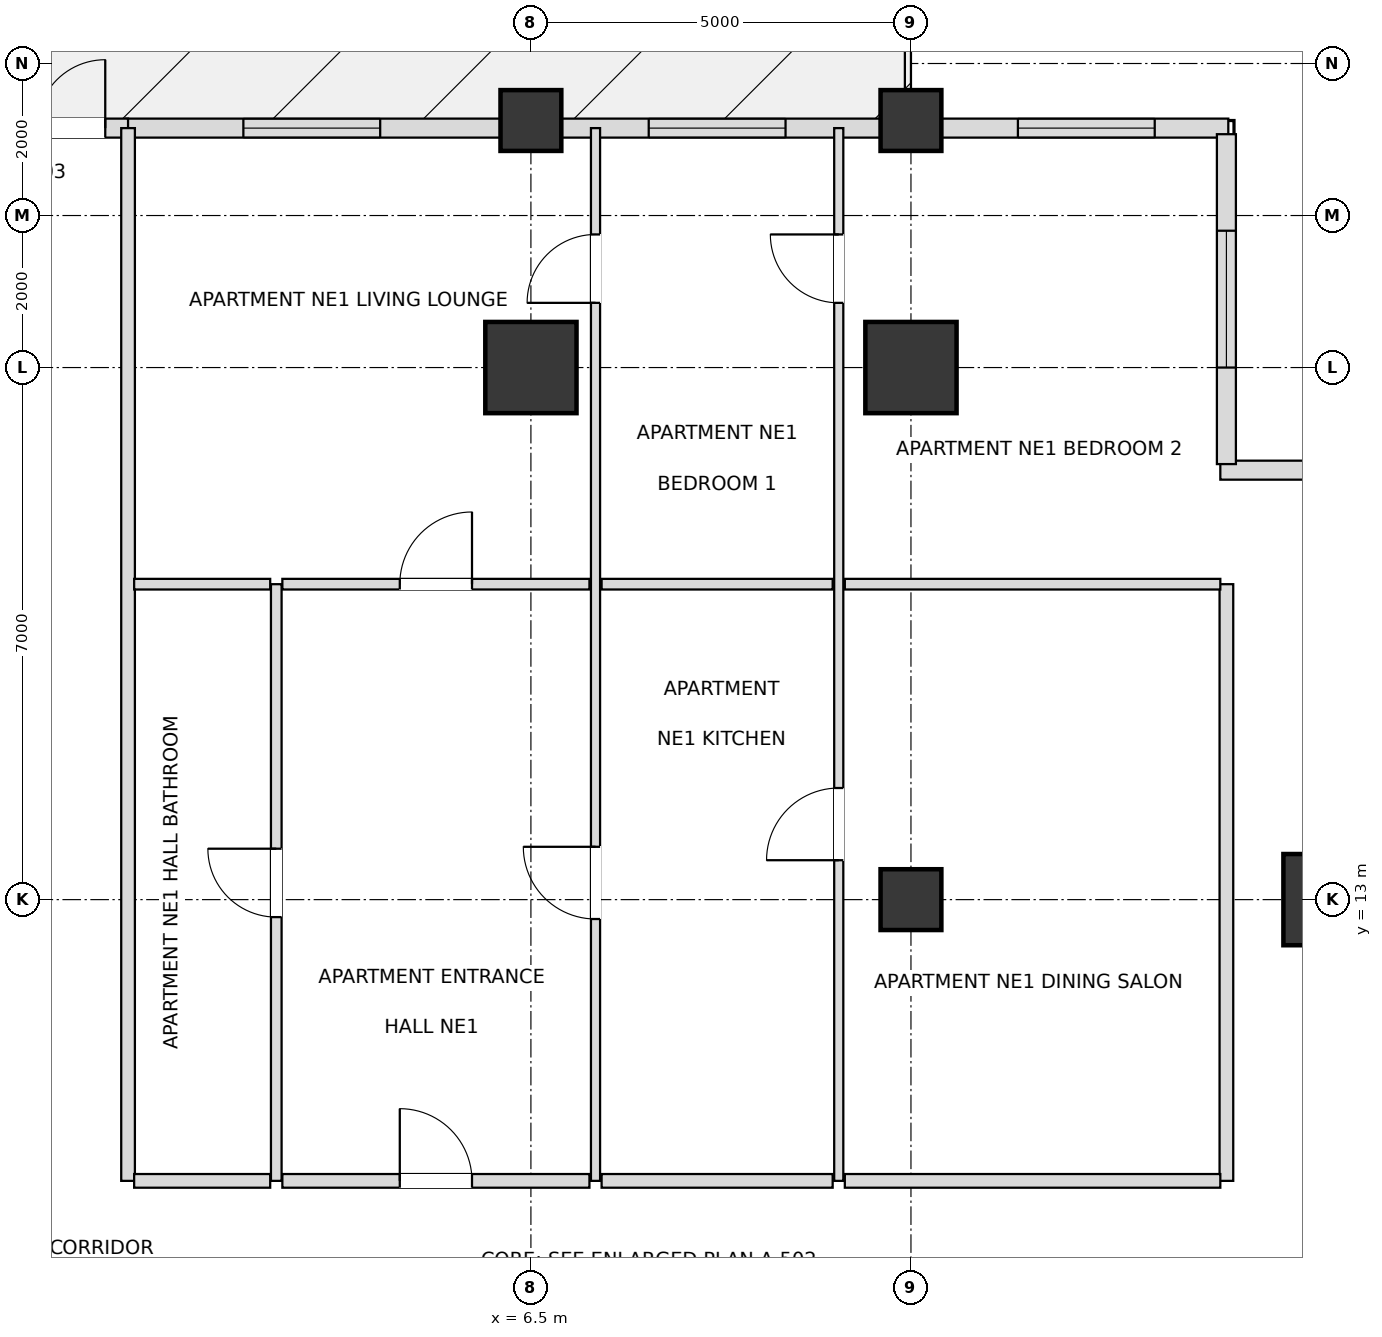
"""IFC4 building model, lengths in metres.
Left out: names, types, materials, properties, quantities, classifications, styles, units other than length and angle.
Written with IfcOpenShell. Run it as: python <this file> out.ifc"""

import sys

from ifc_helpers import new_model, si_unit, direction, frame, frame_2d, origin, origin_2d, place, context, subcontext, project, spatial, rectangle, extrude, element, fill, save


model = new_model("IFC4")
c1 = context("Model", 3, precision=1e-05, world=origin(), true_north=direction((0.0, 1.0)))
c2 = subcontext(c1, "Body", "Model", "MODEL_VIEW")
j1 = project(units=[si_unit("LENGTHUNIT", "METRE"), si_unit("PLANEANGLEUNIT", "RADIAN")], contexts=[c1])
p1 = place(None, origin())
s1 = spatial("IfcSite", under=j1, at=p1, CompositionType="ELEMENT")
p2 = place(p1, origin())
s2 = spatial("IfcBuilding", under=s1, at=p2, CompositionType="ELEMENT")
p3 = place(p2, frame((0.0, 0.0, 99.0)))
s3 = spatial("IfcBuildingStorey", under=s2, at=p3, CompositionType="ELEMENT", Elevation=99.0)
for number, where, z_axis, x_axis in (
    (1, (17.0, 13.0, 0.0), (0.0, 0.0, 1.0), (1.0, 0.0, 0.0)),
    (2, (11.5, 20.0, 0.0), (0.0, 0.0, 1.0), (1.0, 0.0, 0.0)),
    (3, (6.5, 20.0, 0.0), (0.0, 0.0, 1.0), (1.0, 0.0, 0.0)),
):
    element("IfcColumn", number, at=place(p3, frame(where, z_axis=z_axis, x_axis=x_axis)), inside=s3, PredefinedType="USERDEFINED", context=c2, shape_type="SweptSolid", body=[
        extrude(rectangle(XDim=1.2, YDim=1.2, at=origin_2d()), origin(), (0.0, 0.0, 1.0), 3.6),
    ])
for number, where, z_axis, x_axis in (
    (4, (11.5, 13.0, 0.0), (0.0, 0.0, 1.0), (1.0, 0.0, 0.0)),
    (5, (6.5, 23.25, 0.0), (0.0, 0.0, 1.0), (1.0, 0.0, 0.0)),
    (6, (11.5, 23.25, 0.0), (0.0, 0.0, 1.0), (1.0, 0.0, 0.0)),
):
    element("IfcColumn", number, at=place(p3, frame(where, z_axis=z_axis, x_axis=x_axis)), inside=s3, PredefinedType="COLUMN", context=c2, shape_type="SweptSolid", body=[
        extrude(rectangle(XDim=0.8, YDim=0.8, at=origin_2d()), origin(), (0.0, 0.0, 1.0), 3.6),
    ])
p4 = place(p3, frame((15.675, 23.15, 0.0), z_axis=(0.0, 0.0, 1.0), x_axis=(-1.0, 0.0, 0.0)))
e7 = element("IfcWall", 7, at=p4, inside=s3, PredefinedType="SOLIDWALL", context=c2, shape_type="SweptSolid", body=[
    extrude(rectangle(XDim=3.78, YDim=0.25, at=frame_2d((1.89, 0.0))), origin(), (0.0, 0.0, 1.0), 2.736),
])
p5 = place(p4, frame((0.968, 0.0, 0.72)))
e8 = element("IfcOpeningElement", 8, at=p5, cuts=e7, PredefinedType="OPENING", context=c2, shape_type="SweptSolid", body=[
    extrude(rectangle(XDim=1.8, YDim=1.68, at=frame_2d((0.9, 0.84))), frame((0.0, 0.135, 0.0), z_axis=(0.0, -1.0, 0.0), x_axis=(1.0, 0.0, 0.0)), (0.0, 0.0, 1.0), 0.27),
])
p6 = place(p3, frame((11.105, 23.15, 0.0), z_axis=(0.0, 0.0, 1.0), x_axis=(-1.0, 0.0, 0.0)))
e9 = element("IfcWall", 9, at=p6, inside=s3, PredefinedType="SOLIDWALL", context=c2, shape_type="SweptSolid", body=[
    extrude(rectangle(XDim=4.21, YDim=0.25, at=frame_2d((2.105, 0.0))), origin(), (0.0, 0.0, 1.0), 2.736),
])
p7 = place(p6, frame((1.255, 0.0, 0.72)))
e10 = element("IfcOpeningElement", 10, at=p7, cuts=e9, PredefinedType="OPENING", context=c2, shape_type="SweptSolid", body=[
    extrude(rectangle(XDim=1.8, YDim=1.68, at=frame_2d((0.9, 0.84))), frame((0.0, 0.135, 0.0), z_axis=(0.0, -1.0, 0.0), x_axis=(1.0, 0.0, 0.0)), (0.0, 0.0, 1.0), 0.27),
])
p8 = place(p3, frame((6.105, 23.15, 0.0), z_axis=(0.0, 0.0, 1.0), x_axis=(-1.0, 0.0, 0.0)))
e11 = element("IfcWall", 11, at=p8, inside=s3, PredefinedType="SOLIDWALL", context=c2, shape_type="SweptSolid", body=[
    extrude(rectangle(XDim=4.93, YDim=0.25, at=frame_2d((2.465, 0.0))), origin(), (0.0, 0.0, 1.0), 2.736),
])
p9 = place(p8, frame((1.588, 0.0, 0.72)))
e12 = element("IfcOpeningElement", 12, at=p9, cuts=e11, PredefinedType="OPENING", context=c2, shape_type="SweptSolid", body=[
    extrude(rectangle(XDim=1.8, YDim=1.68, at=frame_2d((0.9, 0.84))), frame((0.0, 0.135, 0.0), z_axis=(0.0, -1.0, 0.0), x_axis=(1.0, 0.0, 0.0)), (0.0, 0.0, 1.0), 0.27),
])
p10 = place(p3, frame((-1.2, 23.15, 0.0), z_axis=(0.0, 0.0, 1.0), x_axis=(1.0, 0.0, 0.0)))
e13 = element("IfcWall", 13, at=p10, inside=s3, PredefinedType="SOLIDWALL", context=c2, shape_type="SweptSolid", body=[
    extrude(rectangle(XDim=2.4, YDim=0.25, at=frame_2d((1.2, 0.0))), origin(), (0.0, 0.0, 1.0), 2.736),
])
p11 = place(p10, frame((0.3, 0.0, 0.0)))
e14 = element("IfcOpeningElement", 14, at=p11, cuts=e13, PredefinedType="OPENING", context=c2, shape_type="SweptSolid", body=[
    extrude(rectangle(XDim=1.8, YDim=2.3, at=frame_2d((0.9, 1.15))), frame((0.0, 0.135, 0.0), z_axis=(0.0, -1.0, 0.0), x_axis=(1.0, 0.0, 0.0)), (0.0, 0.0, 1.0), 0.27),
])
p12 = place(p3, frame((20.23, 18.65, 0.0), z_axis=(0.0, 0.0, 1.0), x_axis=(-1.0, 0.0, 0.0)))
e15 = element("IfcWall", 15, at=p12, inside=s3, PredefinedType="SOLIDWALL", context=c2, shape_type="SweptSolid", body=[
    extrude(rectangle(XDim=4.66, YDim=0.25, at=frame_2d((2.33, 0.0))), origin(), (0.0, 0.0, 1.0), 2.736),
])
p13 = place(p12, frame((1.43, 0.0, 0.72)))
e16 = element("IfcOpeningElement", 16, at=p13, cuts=e15, PredefinedType="OPENING", context=c2, shape_type="SweptSolid", body=[
    extrude(rectangle(XDim=1.8, YDim=1.68, at=frame_2d((0.9, 0.84))), frame((0.0, 0.135, 0.0), z_axis=(0.0, -1.0, 0.0), x_axis=(1.0, 0.0, 0.0)), (0.0, 0.0, 1.0), 0.27),
])
p14 = place(p3, frame((15.65, 18.73, 0.0), z_axis=(0.0, 0.0, 1.0), x_axis=(0.0, 1.0, 0.0)))
e17 = element("IfcWall", 17, at=p14, inside=s3, PredefinedType="SOLIDWALL", context=c2, shape_type="SweptSolid", body=[
    extrude(rectangle(XDim=4.34, YDim=0.25, at=frame_2d((2.17, 0.0))), origin(), (0.0, 0.0, 1.0), 2.736),
])
p15 = place(p14, frame((1.27, 0.0, 0.72)))
e18 = element("IfcOpeningElement", 18, at=p15, cuts=e17, PredefinedType="OPENING", context=c2, shape_type="SweptSolid", body=[
    extrude(rectangle(XDim=1.8, YDim=1.68, at=frame_2d((0.9, 0.84))), frame((0.0, 0.135, 0.0), z_axis=(0.0, -1.0, 0.0), x_axis=(1.0, 0.0, 0.0)), (0.0, 0.0, 1.0), 0.27),
])
p16 = place(p3, frame((1.2, 9.3, 0.0), z_axis=(0.0, 0.0, 1.0), x_axis=(0.0, 1.0, 0.0)))
e19 = element("IfcWall", 19, at=p16, inside=s3, PredefinedType="PARTITIONING", context=c2, shape_type="SweptSolid", body=[
    extrude(rectangle(XDim=13.85, YDim=0.18, at=frame_2d((6.925, 0.0))), origin(), (0.0, 0.0, 1.0), 2.816),
])
p17 = place(p3, frame((3.15, 9.3, 0.0), z_axis=(0.0, 0.0, 1.0), x_axis=(0.0, 1.0, 0.0)))
e20 = element("IfcWall", 20, at=p17, inside=s3, PredefinedType="PARTITIONING", context=c2, shape_type="SweptSolid", body=[
    extrude(rectangle(XDim=7.85, YDim=0.14, at=frame_2d((3.925, 0.0))), origin(), (0.0, 0.0, 1.0), 3.38),
])
p18 = place(p17, frame((3.47, 0.0, 0.0)))
e21 = element("IfcOpeningElement", 21, at=p18, cuts=e20, PredefinedType="OPENING", context=c2, shape_type="SweptSolid", body=[
    extrude(rectangle(XDim=0.9, YDim=2.1, at=frame_2d((0.45, 1.05))), frame((0.0, 0.08, 0.0), z_axis=(0.0, -1.0, 0.0), x_axis=(1.0, 0.0, 0.0)), (0.0, 0.0, 1.0), 0.16),
])
p19 = place(p3, frame((7.35, 9.3, 0.0), z_axis=(0.0, 0.0, 1.0), x_axis=(0.0, 1.0, 0.0)))
e22 = element("IfcWall", 22, at=p19, inside=s3, PredefinedType="PARTITIONING", context=c2, shape_type="SweptSolid", body=[
    extrude(rectangle(XDim=13.85, YDim=0.12, at=frame_2d((6.925, 0.0))), origin(), (0.0, 0.0, 1.0), 2.816),
])
p20 = place(p19, frame((3.445, 0.0, 0.0)))
e23 = element("IfcOpeningElement", 23, at=p20, cuts=e22, PredefinedType="OPENING", context=c2, shape_type="SweptSolid", body=[
    extrude(rectangle(XDim=0.95, YDim=2.1, at=frame_2d((0.475, 1.05))), frame((0.0, 0.07, 0.0), z_axis=(0.0, -1.0, 0.0), x_axis=(1.0, 0.0, 0.0)), (0.0, 0.0, 1.0), 0.14),
])
p21 = place(p19, frame((11.551, 0.0, 0.0)))
e24 = element("IfcOpeningElement", 24, at=p21, cuts=e22, PredefinedType="OPENING", context=c2, shape_type="SweptSolid", body=[
    extrude(rectangle(XDim=0.9, YDim=2.1, at=frame_2d((0.45, 1.05))), frame((0.0, 0.07, 0.0), z_axis=(0.0, -1.0, 0.0), x_axis=(1.0, 0.0, 0.0)), (0.0, 0.0, 1.0), 0.14),
])
p22 = place(p3, frame((10.55, 9.3, 0.0), z_axis=(0.0, 0.0, 1.0), x_axis=(0.0, 1.0, 0.0)))
e25 = element("IfcWall", 25, at=p22, inside=s3, PredefinedType="PARTITIONING", context=c2, shape_type="SweptSolid", body=[
    extrude(rectangle(XDim=13.85, YDim=0.12, at=frame_2d((6.925, 0.0))), origin(), (0.0, 0.0, 1.0), 2.816),
])
p23 = place(p22, frame((4.219, 0.0, 0.0)))
e26 = element("IfcOpeningElement", 26, at=p23, cuts=e25, PredefinedType="OPENING", context=c2, shape_type="SweptSolid", body=[
    extrude(rectangle(XDim=0.95, YDim=2.1, at=frame_2d((0.475, 1.05))), frame((0.0, 0.07, 0.0), z_axis=(0.0, -1.0, 0.0), x_axis=(1.0, 0.0, 0.0)), (0.0, 0.0, 1.0), 0.14),
])
p24 = place(p22, frame((11.551, 0.0, 0.0)))
e27 = element("IfcOpeningElement", 27, at=p24, cuts=e25, PredefinedType="OPENING", context=c2, shape_type="SweptSolid", body=[
    extrude(rectangle(XDim=0.9, YDim=2.1, at=frame_2d((0.45, 1.05))), frame((0.0, 0.07, 0.0), z_axis=(0.0, -1.0, 0.0), x_axis=(1.0, 0.0, 0.0)), (0.0, 0.0, 1.0), 0.14),
])
p25 = place(p3, frame((15.65, 9.3, 0.0), z_axis=(0.0, 0.0, 1.0), x_axis=(0.0, 1.0, 0.0)))
e28 = element("IfcWall", 28, at=p25, inside=s3, PredefinedType="PARTITIONING", context=c2, shape_type="SweptSolid", body=[
    extrude(rectangle(XDim=7.85, YDim=0.18, at=frame_2d((3.925, 0.0))), origin(), (0.0, 0.0, 1.0), 2.736),
])
p26 = place(p3, frame((1.28, 9.3, 0.0), z_axis=(0.0, 0.0, 1.0), x_axis=(1.0, 0.0, 0.0)))
e29 = element("IfcWall", 29, at=p26, inside=s3, PredefinedType="PARTITIONING", context=c2, shape_type="SweptSolid", body=[
    extrude(rectangle(XDim=1.79, YDim=0.18, at=frame_2d((0.895, 0.0))), origin(), (0.0, 0.0, 1.0), 3.38),
])
p27 = place(p3, frame((3.23, 9.3, 0.0), z_axis=(0.0, 0.0, 1.0), x_axis=(1.0, 0.0, 0.0)))
e30 = element("IfcWall", 30, at=p27, inside=s3, PredefinedType="PARTITIONING", context=c2, shape_type="SweptSolid", body=[
    extrude(rectangle(XDim=4.04, YDim=0.18, at=frame_2d((2.02, 0.0))), origin(), (0.0, 0.0, 1.0), 2.816),
])
p28 = place(p27, frame((1.545, 0.0, 0.0)))
e31 = element("IfcOpeningElement", 31, at=p28, cuts=e30, PredefinedType="OPENING", context=c2, shape_type="SweptSolid", body=[
    extrude(rectangle(XDim=0.95, YDim=2.15, at=frame_2d((0.475, 1.075))), frame((0.0, 0.1, 0.0), z_axis=(0.0, -1.0, 0.0), x_axis=(1.0, 0.0, 0.0)), (0.0, 0.0, 1.0), 0.2),
])
p29 = place(p3, frame((7.43, 9.3, 0.0), z_axis=(0.0, 0.0, 1.0), x_axis=(1.0, 0.0, 0.0)))
e32 = element("IfcWall", 32, at=p29, inside=s3, PredefinedType="PARTITIONING", context=c2, shape_type="SweptSolid", body=[
    extrude(rectangle(XDim=3.04, YDim=0.18, at=frame_2d((1.52, 0.0))), origin(), (0.0, 0.0, 1.0), 3.38),
])
p30 = place(p3, frame((10.63, 9.3, 0.0), z_axis=(0.0, 0.0, 1.0), x_axis=(1.0, 0.0, 0.0)))
e33 = element("IfcWall", 33, at=p30, inside=s3, PredefinedType="PARTITIONING", context=c2, shape_type="SweptSolid", body=[
    extrude(rectangle(XDim=4.94, YDim=0.18, at=frame_2d((2.47, 0.0))), origin(), (0.0, 0.0, 1.0), 3.38),
])
p31 = place(p3, frame((1.28, 17.15, 0.0), z_axis=(0.0, 0.0, 1.0), x_axis=(1.0, 0.0, 0.0)))
e34 = element("IfcWall", 34, at=p31, inside=s3, PredefinedType="PARTITIONING", context=c2, shape_type="SweptSolid", body=[
    extrude(rectangle(XDim=1.79, YDim=0.14, at=frame_2d((0.895, 0.0))), origin(), (0.0, 0.0, 1.0), 3.38),
])
p32 = place(p3, frame((3.23, 17.15, 0.0), z_axis=(0.0, 0.0, 1.0), x_axis=(1.0, 0.0, 0.0)))
e35 = element("IfcWall", 35, at=p32, inside=s3, PredefinedType="PARTITIONING", context=c2, shape_type="SweptSolid", body=[
    extrude(rectangle(XDim=4.04, YDim=0.14, at=frame_2d((2.02, 0.0))), origin(), (0.0, 0.0, 1.0), 2.816),
])
p33 = place(p32, frame((1.545, 0.0, 0.0)))
e36 = element("IfcOpeningElement", 36, at=p33, cuts=e35, PredefinedType="OPENING", context=c2, shape_type="SweptSolid", body=[
    extrude(rectangle(XDim=0.95, YDim=2.1, at=frame_2d((0.475, 1.05))), frame((0.0, 0.08, 0.0), z_axis=(0.0, -1.0, 0.0), x_axis=(1.0, 0.0, 0.0)), (0.0, 0.0, 1.0), 0.16),
])
p34 = place(p3, frame((7.43, 17.15, 0.0), z_axis=(0.0, 0.0, 1.0), x_axis=(1.0, 0.0, 0.0)))
e37 = element("IfcWall", 37, at=p34, inside=s3, PredefinedType="PARTITIONING", context=c2, shape_type="SweptSolid", body=[
    extrude(rectangle(XDim=3.04, YDim=0.14, at=frame_2d((1.52, 0.0))), origin(), (0.0, 0.0, 1.0), 3.38),
])
p35 = place(p3, frame((10.63, 17.15, 0.0), z_axis=(0.0, 0.0, 1.0), x_axis=(1.0, 0.0, 0.0)))
e38 = element("IfcWall", 38, at=p35, inside=s3, PredefinedType="PARTITIONING", context=c2, shape_type="SweptSolid", body=[
    extrude(rectangle(XDim=4.94, YDim=0.14, at=frame_2d((2.47, 0.0))), origin(), (0.0, 0.0, 1.0), 2.736),
])
p36 = place(p5, origin())
e39 = element("IfcWindow", 39, at=p36, inside=s3, PartitioningType="SINGLE_PANEL", PredefinedType="WINDOW", context=c2, shape_type="SweptSolid", body=[
    extrude(rectangle(XDim=1.8, YDim=1.68, at=frame_2d((0.9, 0.84))), frame((0.0, 0.03, 0.0), z_axis=(0.0, -1.0, 0.0), x_axis=(1.0, 0.0, 0.0)), (0.0, 0.0, 1.0), 0.06),
])
fill(e8, e39)
p37 = place(p7, origin())
e40 = element("IfcWindow", 40, at=p37, inside=s3, PartitioningType="SINGLE_PANEL", PredefinedType="WINDOW", context=c2, shape_type="SweptSolid", body=[
    extrude(rectangle(XDim=1.8, YDim=1.68, at=frame_2d((0.9, 0.84))), frame((0.0, 0.03, 0.0), z_axis=(0.0, -1.0, 0.0), x_axis=(1.0, 0.0, 0.0)), (0.0, 0.0, 1.0), 0.06),
])
fill(e10, e40)
p38 = place(p9, origin())
e41 = element("IfcWindow", 41, at=p38, inside=s3, PartitioningType="SINGLE_PANEL", PredefinedType="WINDOW", context=c2, shape_type="SweptSolid", body=[
    extrude(rectangle(XDim=1.8, YDim=1.68, at=frame_2d((0.9, 0.84))), frame((0.0, 0.03, 0.0), z_axis=(0.0, -1.0, 0.0), x_axis=(1.0, 0.0, 0.0)), (0.0, 0.0, 1.0), 0.06),
])
fill(e12, e41)
p39 = place(p11, origin())
e42 = element("IfcDoor", 42, at=p39, inside=s3, OperationType="DOUBLE_DOOR_SINGLE_SWING", PredefinedType="DOOR", context=c2, shape_type="SweptSolid", body=[
    extrude(rectangle(XDim=1.8, YDim=2.3, at=frame_2d((0.9, 1.15))), frame((0.0, 0.025, 0.0), z_axis=(0.0, -1.0, 0.0), x_axis=(1.0, 0.0, 0.0)), (0.0, 0.0, 1.0), 0.05),
])
fill(e14, e42)
p40 = place(p15, origin())
e43 = element("IfcWindow", 43, at=p40, inside=s3, PartitioningType="SINGLE_PANEL", PredefinedType="WINDOW", context=c2, shape_type="SweptSolid", body=[
    extrude(rectangle(XDim=1.8, YDim=1.68, at=frame_2d((0.9, 0.84))), frame((0.0, 0.03, 0.0), z_axis=(0.0, -1.0, 0.0), x_axis=(1.0, 0.0, 0.0)), (0.0, 0.0, 1.0), 0.06),
])
fill(e18, e43)
p41 = place(p18, origin())
e44 = element("IfcDoor", 44, at=p41, inside=s3, OperationType="SINGLE_SWING_RIGHT", PredefinedType="DOOR", context=c2, shape_type="SweptSolid", body=[
    extrude(rectangle(XDim=0.9, YDim=2.1, at=frame_2d((0.45, 1.05))), frame((0.0, 0.025, 0.0), z_axis=(0.0, -1.0, 0.0), x_axis=(1.0, 0.0, 0.0)), (0.0, 0.0, 1.0), 0.05),
])
fill(e21, e44)
p42 = place(p28, origin())
e45 = element("IfcDoor", 45, at=p42, inside=s3, OperationType="SINGLE_SWING_LEFT", PredefinedType="DOOR", context=c2, shape_type="SweptSolid", body=[
    extrude(rectangle(XDim=0.95, YDim=2.15, at=frame_2d((0.475, 1.075))), frame((0.0, 0.025, 0.0), z_axis=(0.0, -1.0, 0.0), x_axis=(1.0, 0.0, 0.0)), (0.0, 0.0, 1.0), 0.05),
])
fill(e31, e45)
p43 = place(p20, origin())
e46 = element("IfcDoor", 46, at=p43, inside=s3, OperationType="SINGLE_SWING_RIGHT", PredefinedType="DOOR", context=c2, shape_type="SweptSolid", body=[
    extrude(rectangle(XDim=0.95, YDim=2.1, at=frame_2d((0.475, 1.05))), frame((0.0, 0.025, 0.0), z_axis=(0.0, -1.0, 0.0), x_axis=(1.0, 0.0, 0.0)), (0.0, 0.0, 1.0), 0.05),
])
fill(e23, e46)
p44 = place(p23, origin())
e47 = element("IfcDoor", 47, at=p44, inside=s3, OperationType="SINGLE_SWING_LEFT", PredefinedType="DOOR", context=c2, shape_type="SweptSolid", body=[
    extrude(rectangle(XDim=0.95, YDim=2.1, at=frame_2d((0.475, 1.05))), frame((0.0, 0.025, 0.0), z_axis=(0.0, -1.0, 0.0), x_axis=(1.0, 0.0, 0.0)), (0.0, 0.0, 1.0), 0.05),
])
fill(e26, e47)
p45 = place(p33, origin())
e48 = element("IfcDoor", 48, at=p45, inside=s3, OperationType="SINGLE_SWING_RIGHT", PredefinedType="DOOR", context=c2, shape_type="SweptSolid", body=[
    extrude(rectangle(XDim=0.95, YDim=2.1, at=frame_2d((0.475, 1.05))), frame((0.0, 0.025, 0.0), z_axis=(0.0, -1.0, 0.0), x_axis=(1.0, 0.0, 0.0)), (0.0, 0.0, 1.0), 0.05),
])
fill(e36, e48)
p46 = place(p21, origin())
e49 = element("IfcDoor", 49, at=p46, inside=s3, OperationType="SINGLE_SWING_LEFT", PredefinedType="DOOR", context=c2, shape_type="SweptSolid", body=[
    extrude(rectangle(XDim=0.9, YDim=2.1, at=frame_2d((0.45, 1.05))), frame((0.0, 0.025, 0.0), z_axis=(0.0, -1.0, 0.0), x_axis=(1.0, 0.0, 0.0)), (0.0, 0.0, 1.0), 0.05),
])
fill(e24, e49)
p47 = place(p24, origin())
e50 = element("IfcDoor", 50, at=p47, inside=s3, OperationType="SINGLE_SWING_RIGHT", PredefinedType="DOOR", context=c2, shape_type="SweptSolid", body=[
    extrude(rectangle(XDim=0.9, YDim=2.1, at=frame_2d((0.45, 1.05))), frame((0.0, 0.025, 0.0), z_axis=(0.0, -1.0, 0.0), x_axis=(1.0, 0.0, 0.0)), (0.0, 0.0, 1.0), 0.05),
])
fill(e27, e50)
save(model, sys.argv[1])
